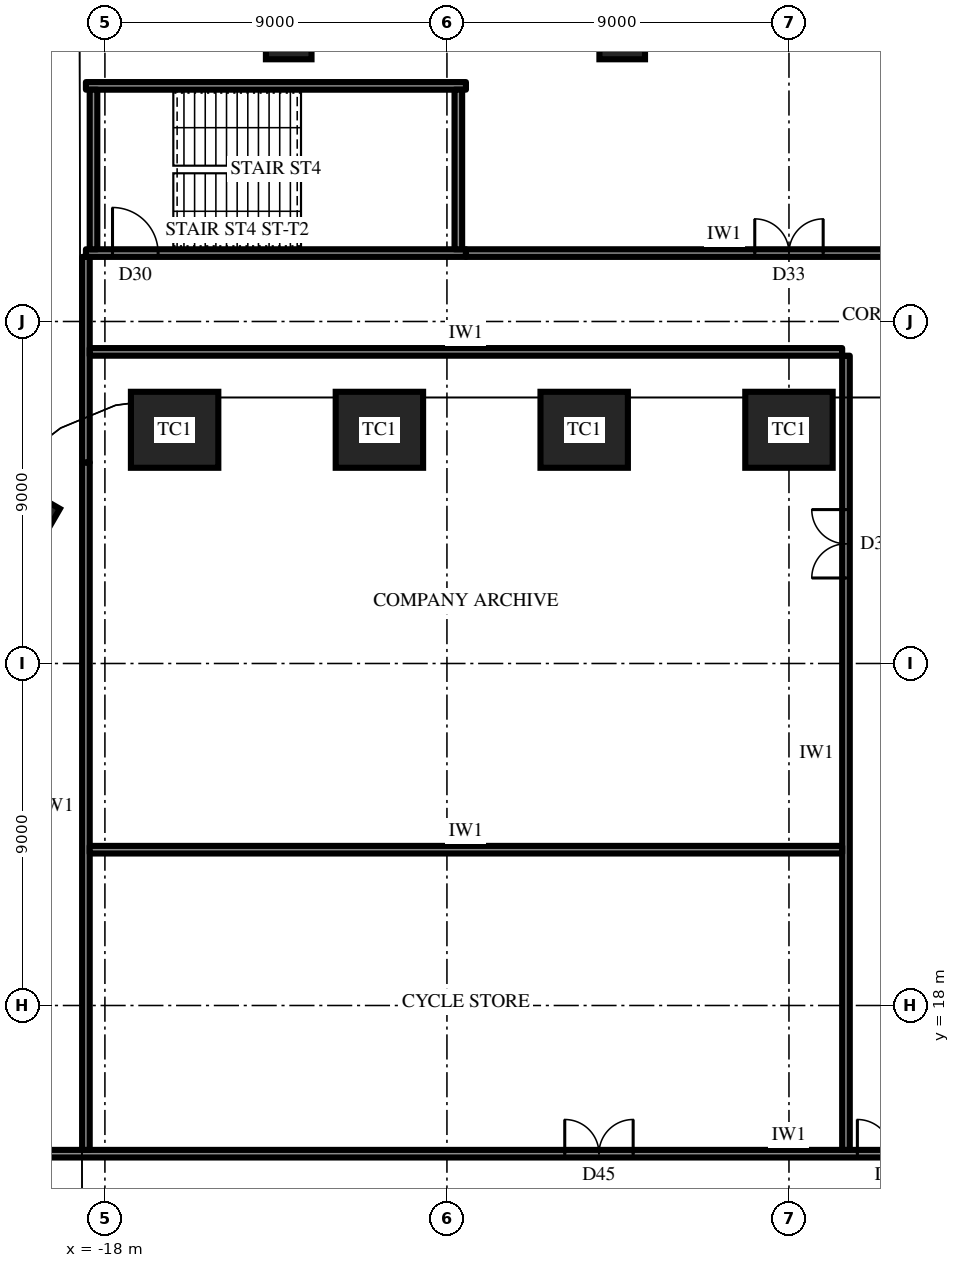
"""IFC4 building model, lengths in metres.
Left out: names, types, materials, properties, quantities, classifications, styles, units other than length and angle.
Written with IfcOpenShell. Run it as: python <this file> out.ifc"""

import sys

from ifc_helpers import new_model, si_unit, direction, frame, frame_2d, origin, origin_2d, place, context, subcontext, project, spatial, rectangle, extrude, element, fill, save


model = new_model("IFC4")
c1 = context("Model", 3, precision=1e-05, world=origin(), true_north=direction((0.0, 1.0)))
c2 = subcontext(c1, "Body", "Model", "MODEL_VIEW")
j1 = project(units=[si_unit("LENGTHUNIT", "METRE"), si_unit("PLANEANGLEUNIT", "RADIAN")], contexts=[c1])
p1 = place(None, origin())
s1 = spatial("IfcSite", under=j1, at=p1, CompositionType="ELEMENT")
p2 = place(p1, origin())
s2 = spatial("IfcBuilding", under=s1, at=p2, CompositionType="ELEMENT")
p3 = place(p2, frame((0.0, 0.0, -4.5)))
s3 = spatial("IfcBuildingStorey", under=s2, at=p3, CompositionType="ELEMENT", Elevation=-4.5)
for number, where, z_axis, x_axis in (
    (1, (0.0, 33.15, 0.0), (0.0, 0.0, 1.0), (-1.0, 0.0, 0.0)),
    (2, (-5.389, 33.15, 0.0), (0.0, 0.0, 1.0), (-1.0, 0.0, 0.0)),
    (3, (-10.777, 33.15, 0.0), (0.0, 0.0, 1.0), (-1.0, 0.0, 0.0)),
    (4, (-16.166, 33.15, 0.0), (0.0, 0.0, 1.0), (-1.0, 0.0, 0.0)),
    (5, (-20.626, 30.575, 0.0), (0.0, 0.0, 1.0), (-0.5, -0.866, 0.0)),
):
    element("IfcColumn", number, at=place(p3, frame(where, z_axis=z_axis, x_axis=x_axis)), inside=s3, PredefinedType="COLUMN", context=c2, shape_type="SweptSolid", body=[
        extrude(rectangle(XDim=2.3, YDim=2.0, at=origin_2d()), origin(), (0.0, 0.0, 1.0), 4.5),
    ])
p4 = place(p3, frame((-18.5, 37.8, 0.0), z_axis=(0.0, 0.0, 1.0), x_axis=(1.0, 0.0, 0.0)))
e6 = element("IfcWall", 6, at=p4, inside=s3, PredefinedType="SHEAR", context=c2, shape_type="SweptSolid", body=[
    extrude(rectangle(XDim=10.0, YDim=0.2, at=frame_2d((5.0, 0.0))), origin(), (0.0, 0.0, 1.0), 4.5),
])
p5 = place(p4, frame((0.7, 0.0, 0.0)))
e7 = element("IfcOpeningElement", 7, at=p5, cuts=e6, PredefinedType="OPENING", context=c2, shape_type="SweptSolid", body=[
    extrude(rectangle(XDim=1.2, YDim=2.2, at=frame_2d((0.6, 1.1))), frame((0.0, 0.11, 0.0), z_axis=(0.0, -1.0, 0.0), x_axis=(1.0, 0.0, 0.0)), (0.0, 0.0, 1.0), 0.22),
])
p6 = place(p3, frame((-8.5, 42.2, 0.0), z_axis=(0.0, 0.0, 1.0), x_axis=(-1.0, 0.0, 0.0)))
e8 = element("IfcWall", 8, at=p6, inside=s3, PredefinedType="SHEAR", context=c2, shape_type="SweptSolid", body=[
    extrude(rectangle(XDim=10.0, YDim=0.2, at=frame_2d((5.0, 0.0))), origin(), (0.0, 0.0, 1.0), 4.5),
])
for number, where, z_axis, x_axis in (
    (9, (-18.3, 42.1, 0.0), (0.0, 0.0, 1.0), (0.0, -1.0, 0.0)),
    (10, (-8.7, 37.9, 0.0), (0.0, 0.0, 1.0), (0.0, 1.0, 0.0)),
):
    element("IfcWall", number, at=place(p3, frame(where, z_axis=z_axis, x_axis=x_axis)), inside=s3, PredefinedType="SHEAR", context=c2, shape_type="SweptSolid", body=[
        extrude(rectangle(XDim=4.2, YDim=0.2, at=frame_2d((2.1, 0.0))), origin(), (0.0, 0.0, 1.0), 4.5),
    ])
for number, where, z_axis, x_axis in (
    (11, (-4.388, 43.5, 0.0), (0.0, 0.0, 1.0), (-1.0, 0.0, 0.0)),
    (12, (-13.164, 43.5, 0.0), (0.0, 0.0, 1.0), (-1.0, 0.0, 0.0)),
):
    element("IfcColumn", number, at=place(p3, frame(where, z_axis=z_axis, x_axis=x_axis)), inside=s3, PredefinedType="COLUMN", context=c2, shape_type="SweptSolid", body=[
        extrude(rectangle(XDim=1.2, YDim=1.2, at=origin_2d()), origin(), (0.0, 0.0, 1.0), 4.5),
    ])
p7 = place(p3, frame((-44.283, 14.1, 0.0), z_axis=(0.0, 0.0, 1.0), x_axis=(1.0, 0.0, 0.0)))
e13 = element("IfcWall", 13, at=p7, inside=s3, PredefinedType="PARTITIONING", context=c2, shape_type="SweptSolid", body=[
    extrude(rectangle(XDim=88.565, YDim=0.2, at=frame_2d((44.283, 0.0))), origin(), (0.0, 0.0, 1.0), 4.15),
])
p8 = place(p7, frame((38.383, 0.0, 0.0)))
e14 = element("IfcOpeningElement", 14, at=p8, cuts=e13, PredefinedType="OPENING", context=c2, shape_type="SweptSolid", body=[
    extrude(rectangle(XDim=1.8, YDim=2.4, at=frame_2d((0.9, 1.2))), frame((0.0, 0.11, 0.0), z_axis=(0.0, -1.0, 0.0), x_axis=(1.0, 0.0, 0.0)), (0.0, 0.0, 1.0), 0.22),
])
p9 = place(p7, frame((55.783, 0.0, 0.0)))
e15 = element("IfcOpeningElement", 15, at=p9, cuts=e13, PredefinedType="OPENING", context=c2, shape_type="SweptSolid", body=[
    extrude(rectangle(XDim=1.0, YDim=2.2, at=frame_2d((0.5, 1.1))), frame((0.0, 0.11, 0.0), z_axis=(0.0, -1.0, 0.0), x_axis=(1.0, 0.0, 0.0)), (0.0, 0.0, 1.0), 0.22),
])
p10 = place(p7, frame((46.083, 0.0, 0.0)))
e16 = element("IfcOpeningElement", 16, at=p10, cuts=e13, PredefinedType="OPENING", context=c2, shape_type="SweptSolid", body=[
    extrude(rectangle(XDim=1.8, YDim=2.4, at=frame_2d((0.9, 1.2))), frame((0.0, 0.11, 0.0), z_axis=(0.0, -1.0, 0.0), x_axis=(1.0, 0.0, 0.0)), (0.0, 0.0, 1.0), 0.22),
])
p11 = place(p7, frame((63.633, 0.0, 0.0)))
e17 = element("IfcOpeningElement", 17, at=p11, cuts=e13, PredefinedType="OPENING", context=c2, shape_type="SweptSolid", body=[
    extrude(rectangle(XDim=1.0, YDim=2.2, at=frame_2d((0.5, 1.1))), frame((0.0, 0.11, 0.0), z_axis=(0.0, -1.0, 0.0), x_axis=(1.0, 0.0, 0.0)), (0.0, 0.0, 1.0), 0.22),
])
p12 = place(p3, frame((-18.5, 14.2, 0.0), z_axis=(0.0, 0.0, 1.0), x_axis=(0.0, 1.0, 0.0)))
e18 = element("IfcWall", 18, at=p12, inside=s3, PredefinedType="PARTITIONING", context=c2, shape_type="SweptSolid", body=[
    extrude(rectangle(XDim=18.09, YDim=0.2, at=frame_2d((9.045, 0.0))), origin(), (0.0, 0.0, 1.0), 3.094),
])
p13 = place(p3, frame((-18.5, 32.29, 0.0), z_axis=(0.0, 0.0, 1.0), x_axis=(0.0, 1.0, 0.0)))
e19 = element("IfcWall", 19, at=p13, inside=s3, PredefinedType="PARTITIONING", context=c2, shape_type="SweptSolid", body=[
    extrude(rectangle(XDim=5.41, YDim=0.2, at=frame_2d((2.705, 0.0))), origin(), (0.0, 0.0, 1.0), 4.15),
])
p14 = place(p3, frame((1.5, 14.2, 0.0), z_axis=(0.0, 0.0, 1.0), x_axis=(0.0, 1.0, 0.0)))
e20 = element("IfcWall", 20, at=p14, inside=s3, PredefinedType="PARTITIONING", context=c2, shape_type="SweptSolid", body=[
    extrude(rectangle(XDim=20.9, YDim=0.2, at=frame_2d((10.45, 0.0))), origin(), (0.0, 0.0, 1.0), 4.15),
])
p15 = place(p14, frame((15.05, 0.0, 0.0)))
e21 = element("IfcOpeningElement", 21, at=p15, cuts=e20, PredefinedType="OPENING", context=c2, shape_type="SweptSolid", body=[
    extrude(rectangle(XDim=1.8, YDim=2.4, at=frame_2d((0.9, 1.2))), frame((0.0, 0.11, 0.0), z_axis=(0.0, -1.0, 0.0), x_axis=(1.0, 0.0, 0.0)), (0.0, 0.0, 1.0), 0.22),
])
for number, where, z_axis, x_axis in (
    (22, (-18.4, 22.1, 0.0), (0.0, 0.0, 1.0), (1.0, 0.0, 0.0)),
    (23, (-18.4, 35.2, 0.0), (0.0, 0.0, 1.0), (1.0, 0.0, 0.0)),
):
    element("IfcWall", number, at=place(p3, frame(where, z_axis=z_axis, x_axis=x_axis)), inside=s3, PredefinedType="PARTITIONING", context=c2, shape_type="SweptSolid", body=[
        extrude(rectangle(XDim=19.8, YDim=0.2, at=frame_2d((9.9, 0.0))), origin(), (0.0, 0.0, 1.0), 4.15),
    ])
p16 = place(p3, frame((-8.5, 37.8, 0.0), z_axis=(0.0, 0.0, 1.0), x_axis=(1.0, 0.0, 0.0)))
e24 = element("IfcWall", 24, at=p16, inside=s3, PredefinedType="PARTITIONING", context=c2, shape_type="SweptSolid", body=[
    extrude(rectangle(XDim=17.0, YDim=0.2, at=frame_2d((8.5, 0.0))), origin(), (0.0, 0.0, 1.0), 4.15),
])
p17 = place(p16, frame((7.6, 0.0, 0.0)))
e25 = element("IfcOpeningElement", 25, at=p17, cuts=e24, PredefinedType="OPENING", context=c2, shape_type="SweptSolid", body=[
    extrude(rectangle(XDim=1.8, YDim=2.4, at=frame_2d((0.9, 1.2))), frame((0.0, 0.11, 0.0), z_axis=(0.0, -1.0, 0.0), x_axis=(1.0, 0.0, 0.0)), (0.0, 0.0, 1.0), 0.22),
])
p18 = place(p8, origin())
e26 = element("IfcDoor", 26, at=p18, inside=s3, OperationType="DOUBLE_DOOR_SINGLE_SWING", PredefinedType="DOOR", context=c2, shape_type="SweptSolid", body=[
    extrude(rectangle(XDim=1.8, YDim=2.4, at=frame_2d((0.9, 1.2))), frame((0.0, 0.025, 0.0), z_axis=(0.0, -1.0, 0.0), x_axis=(1.0, 0.0, 0.0)), (0.0, 0.0, 1.0), 0.05),
])
fill(e14, e26)
p19 = place(p10, origin())
e27 = element("IfcDoor", 27, at=p19, inside=s3, OperationType="DOUBLE_DOOR_SINGLE_SWING", PredefinedType="DOOR", context=c2, shape_type="SweptSolid", body=[
    extrude(rectangle(XDim=1.8, YDim=2.4, at=frame_2d((0.9, 1.2))), frame((0.0, 0.025, 0.0), z_axis=(0.0, -1.0, 0.0), x_axis=(1.0, 0.0, 0.0)), (0.0, 0.0, 1.0), 0.05),
])
fill(e16, e27)
p20 = place(p15, origin())
e28 = element("IfcDoor", 28, at=p20, inside=s3, OperationType="DOUBLE_DOOR_SINGLE_SWING", PredefinedType="DOOR", context=c2, shape_type="SweptSolid", body=[
    extrude(rectangle(XDim=1.8, YDim=2.4, at=frame_2d((0.9, 1.2))), frame((0.0, 0.025, 0.0), z_axis=(0.0, -1.0, 0.0), x_axis=(1.0, 0.0, 0.0)), (0.0, 0.0, 1.0), 0.05),
])
fill(e21, e28)
p21 = place(p17, origin())
e29 = element("IfcDoor", 29, at=p21, inside=s3, OperationType="DOUBLE_DOOR_SINGLE_SWING", PredefinedType="DOOR", context=c2, shape_type="SweptSolid", body=[
    extrude(rectangle(XDim=1.8, YDim=2.4, at=frame_2d((0.9, 1.2))), frame((0.0, 0.025, 0.0), z_axis=(0.0, -1.0, 0.0), x_axis=(1.0, 0.0, 0.0)), (0.0, 0.0, 1.0), 0.05),
])
fill(e25, e29)
p22 = place(p5, origin())
e30 = element("IfcDoor", 30, at=p22, inside=s3, OperationType="SINGLE_SWING_RIGHT", PredefinedType="DOOR", context=c2, shape_type="SweptSolid", body=[
    extrude(rectangle(XDim=1.2, YDim=2.2, at=frame_2d((0.6, 1.1))), frame((0.0, 0.025, 0.0), z_axis=(0.0, -1.0, 0.0), x_axis=(1.0, 0.0, 0.0)), (0.0, 0.0, 1.0), 0.05),
])
fill(e7, e30)
save(model, sys.argv[1])
